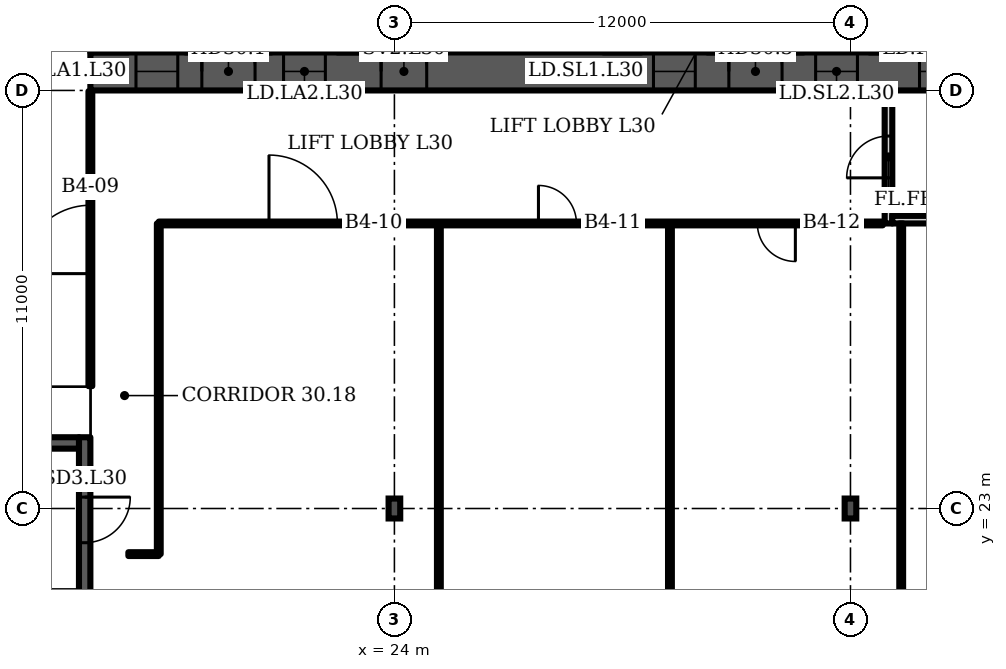
"""IFC4 building model, lengths in metres.
Left out: names, types, materials, properties, quantities, classifications, styles, units other than length and angle.
Written with IfcOpenShell. Run it as: python <this file> out.ifc"""

import sys

from ifc_helpers import new_model, si_unit, direction, frame, frame_2d, origin, origin_2d, place, context, subcontext, project, spatial, rectangle, i_section, extrude, element, fill, save


model = new_model("IFC4")
c1 = context("Model", 3, precision=1e-05, world=origin(), true_north=direction((0.0, 1.0)))
c2 = subcontext(c1, "Body", "Model", "MODEL_VIEW")
j1 = project(units=[si_unit("LENGTHUNIT", "METRE"), si_unit("PLANEANGLEUNIT", "RADIAN")], contexts=[c1])
p1 = place(None, origin())
s1 = spatial("IfcSite", under=j1, at=p1, CompositionType="ELEMENT")
p2 = place(p1, origin())
s2 = spatial("IfcBuilding", under=s1, at=p2, CompositionType="ELEMENT")
p3 = place(p2, frame((0.0, 0.0, 129.1)))
s3 = spatial("IfcBuildingStorey", under=s2, at=p3, CompositionType="ELEMENT", Elevation=129.1)
p4 = place(p3, frame((16.0, 34.5, 0.0), z_axis=(0.0, 0.0, 1.0), x_axis=(1.0, 0.0, 0.0)))
e1 = element("IfcWall", 1, at=p4, inside=s3, PredefinedType="SHEAR", context=c2, shape_type="SweptSolid", body=[
    extrude(rectangle(XDim=49.0, YDim=1.0, at=frame_2d((24.5, 0.0))), origin(), (0.0, 0.0, 1.0), 3.6),
])
p5 = place(p4, frame((1.2, 0.0, 0.0)))
e2 = element("IfcOpeningElement", 2, at=p5, cuts=e1, PredefinedType="OPENING", context=c2, shape_type="SweptSolid", body=[
    extrude(rectangle(XDim=1.1, YDim=2.1, at=frame_2d((0.55, 1.05))), frame((0.0, 0.51, 0.0), z_axis=(0.0, -1.0, 0.0), x_axis=(1.0, 0.0, 0.0)), (0.0, 0.0, 1.0), 1.02),
])
p6 = place(p4, frame((5.083, 0.0, 0.0)))
e3 = element("IfcOpeningElement", 3, at=p6, cuts=e1, PredefinedType="OPENING", context=c2, shape_type="SweptSolid", body=[
    extrude(rectangle(XDim=1.1, YDim=2.1, at=frame_2d((0.55, 1.05))), frame((0.0, 0.51, 0.0), z_axis=(0.0, -1.0, 0.0), x_axis=(1.0, 0.0, 0.0)), (0.0, 0.0, 1.0), 1.02),
])
p7 = place(p4, frame((2.933, 0.0, 0.0)))
e4 = element("IfcOpeningElement", 4, at=p7, cuts=e1, PredefinedType="OPENING", context=c2, shape_type="SweptSolid", body=[
    extrude(rectangle(XDim=1.4, YDim=2.1, at=frame_2d((0.7, 1.05))), frame((0.0, 0.51, 0.0), z_axis=(0.0, -1.0, 0.0), x_axis=(1.0, 0.0, 0.0)), (0.0, 0.0, 1.0), 1.02),
])
p8 = place(p4, frame((7.65, 0.0, 0.0)))
e5 = element("IfcOpeningElement", 5, at=p8, cuts=e1, PredefinedType="OPENING", context=c2, shape_type="SweptSolid", body=[
    extrude(rectangle(XDim=1.2, YDim=2.1, at=frame_2d((0.6, 1.05))), frame((0.0, 0.51, 0.0), z_axis=(0.0, -1.0, 0.0), x_axis=(1.0, 0.0, 0.0)), (0.0, 0.0, 1.0), 1.02),
])
p9 = place(p4, frame((14.817, 0.0, 0.0)))
e6 = element("IfcOpeningElement", 6, at=p9, cuts=e1, PredefinedType="OPENING", context=c2, shape_type="SweptSolid", body=[
    extrude(rectangle(XDim=1.1, YDim=2.1, at=frame_2d((0.55, 1.05))), frame((0.0, 0.51, 0.0), z_axis=(0.0, -1.0, 0.0), x_axis=(1.0, 0.0, 0.0)), (0.0, 0.0, 1.0), 1.02),
])
p10 = place(p4, frame((19.083, 0.0, 0.0)))
e7 = element("IfcOpeningElement", 7, at=p10, cuts=e1, PredefinedType="OPENING", context=c2, shape_type="SweptSolid", body=[
    extrude(rectangle(XDim=1.1, YDim=2.1, at=frame_2d((0.55, 1.05))), frame((0.0, 0.51, 0.0), z_axis=(0.0, -1.0, 0.0), x_axis=(1.0, 0.0, 0.0)), (0.0, 0.0, 1.0), 1.02),
])
p11 = place(p4, frame((16.8, 0.0, 0.0)))
e8 = element("IfcOpeningElement", 8, at=p11, cuts=e1, PredefinedType="OPENING", context=c2, shape_type="SweptSolid", body=[
    extrude(rectangle(XDim=1.4, YDim=2.1, at=frame_2d((0.7, 1.05))), frame((0.0, 0.51, 0.0), z_axis=(0.0, -1.0, 0.0), x_axis=(1.0, 0.0, 0.0)), (0.0, 0.0, 1.0), 1.02),
])
p12 = place(p4, frame((21.817, 0.0, 0.0)))
e9 = element("IfcOpeningElement", 9, at=p12, cuts=e1, PredefinedType="OPENING", context=c2, shape_type="SweptSolid", body=[
    extrude(rectangle(XDim=1.1, YDim=2.1, at=frame_2d((0.55, 1.05))), frame((0.0, 0.51, 0.0), z_axis=(0.0, -1.0, 0.0), x_axis=(1.0, 0.0, 0.0)), (0.0, 0.0, 1.0), 1.02),
])
p13 = place(p4, frame((26.083, 0.0, 0.0)))
e10 = element("IfcOpeningElement", 10, at=p13, cuts=e1, PredefinedType="OPENING", context=c2, shape_type="SweptSolid", body=[
    extrude(rectangle(XDim=1.1, YDim=2.1, at=frame_2d((0.55, 1.05))), frame((0.0, 0.51, 0.0), z_axis=(0.0, -1.0, 0.0), x_axis=(1.0, 0.0, 0.0)), (0.0, 0.0, 1.0), 1.02),
])
p14 = place(p4, frame((33.15, 0.0, 0.0)))
e11 = element("IfcOpeningElement", 11, at=p14, cuts=e1, PredefinedType="OPENING", context=c2, shape_type="SweptSolid", body=[
    extrude(rectangle(XDim=1.2, YDim=2.1, at=frame_2d((0.6, 1.05))), frame((0.0, 0.51, 0.0), z_axis=(0.0, -1.0, 0.0), x_axis=(1.0, 0.0, 0.0)), (0.0, 0.0, 1.0), 1.02),
])
p15 = place(p4, frame((37.8, 0.0, 0.0)))
e12 = element("IfcOpeningElement", 12, at=p15, cuts=e1, PredefinedType="OPENING", context=c2, shape_type="SweptSolid", body=[
    extrude(rectangle(XDim=1.4, YDim=2.1, at=frame_2d((0.7, 1.05))), frame((0.0, 0.51, 0.0), z_axis=(0.0, -1.0, 0.0), x_axis=(1.0, 0.0, 0.0)), (0.0, 0.0, 1.0), 1.02),
])
p16 = place(p4, frame((42.817, 0.0, 0.0)))
e13 = element("IfcOpeningElement", 13, at=p16, cuts=e1, PredefinedType="OPENING", context=c2, shape_type="SweptSolid", body=[
    extrude(rectangle(XDim=1.1, YDim=2.1, at=frame_2d((0.55, 1.05))), frame((0.0, 0.51, 0.0), z_axis=(0.0, -1.0, 0.0), x_axis=(1.0, 0.0, 0.0)), (0.0, 0.0, 1.0), 1.02),
])
p17 = place(p4, frame((46.7, 0.0, 0.0)))
e14 = element("IfcOpeningElement", 14, at=p17, cuts=e1, PredefinedType="OPENING", context=c2, shape_type="SweptSolid", body=[
    extrude(rectangle(XDim=1.1, YDim=2.1, at=frame_2d((0.55, 1.05))), frame((0.0, 0.51, 0.0), z_axis=(0.0, -1.0, 0.0), x_axis=(1.0, 0.0, 0.0)), (0.0, 0.0, 1.0), 1.02),
])
p18 = place(p4, frame((44.667, 0.0, 0.0)))
e15 = element("IfcOpeningElement", 15, at=p18, cuts=e1, PredefinedType="OPENING", context=c2, shape_type="SweptSolid", body=[
    extrude(rectangle(XDim=1.4, YDim=2.1, at=frame_2d((0.7, 1.05))), frame((0.0, 0.51, 0.0), z_axis=(0.0, -1.0, 0.0), x_axis=(1.0, 0.0, 0.0)), (0.0, 0.0, 1.0), 1.02),
])
for number, where, z_axis, x_axis in (
    (16, (24.0, 23.0, 0.0), (0.0, 0.0, 1.0), (1.0, 0.0, 0.0)),
    (17, (36.0, 23.0, 0.0), (0.0, 0.0, 1.0), (1.0, 0.0, 0.0)),
):
    element("IfcColumn", number, at=place(p3, frame(where, z_axis=z_axis, x_axis=x_axis)), inside=s3, PredefinedType="COLUMN", context=c2, shape_type="SweptSolid", body=[
        extrude(i_section(OverallWidth=0.306, OverallDepth=0.524, WebThickness=0.021, FlangeThickness=0.04, FilletRadius=0.027, at=origin_2d()), origin(), (0.0, 0.0, 1.0), 3.6),
    ])
p19 = place(p3, frame((37.0, 30.5, 0.0), z_axis=(0.0, 0.0, 1.0), x_axis=(0.0, 1.0, 0.0)))
e18 = element("IfcWall", 18, at=p19, inside=s3, PredefinedType="PARTITIONING", context=c2, shape_type="SweptSolid", body=[
    extrude(rectangle(XDim=3.5, YDim=0.2, at=frame_2d((1.75, 0.0))), origin(), (0.0, 0.0, 1.0), 3.2),
])
p20 = place(p19, frame((1.2, 0.0, 0.0)))
e19 = element("IfcOpeningElement", 19, at=p20, cuts=e18, PredefinedType="OPENING", context=c2, shape_type="SweptSolid", body=[
    extrude(rectangle(XDim=1.1, YDim=2.1, at=frame_2d((0.55, 1.05))), frame((0.0, 0.11, 0.0), z_axis=(0.0, -1.0, 0.0), x_axis=(1.0, 0.0, 0.0)), (0.0, 0.0, 1.0), 0.22),
])
p21 = place(p3, frame((37.1, 30.6, 0.0), z_axis=(0.0, 0.0, 1.0), x_axis=(1.0, 0.0, 0.0)))
e20 = element("IfcWall", 20, at=p21, inside=s3, PredefinedType="PARTITIONING", context=c2, shape_type="SweptSolid", body=[
    extrude(rectangle(XDim=2.8, YDim=0.2, at=frame_2d((1.4, 0.0))), origin(), (0.0, 0.0, 1.0), 3.2),
])
p22 = place(p3, frame((15.85, 20.525, 0.0), z_axis=(0.0, 0.0, 1.0), x_axis=(0.0, 1.0, 0.0)))
e21 = element("IfcWall", 21, at=p22, inside=s3, PredefinedType="SHEAR", context=c2, shape_type="SweptSolid", body=[
    extrude(rectangle(XDim=4.35, YDim=0.3, at=frame_2d((2.175, 0.0))), origin(), (0.0, 0.0, 1.0), 3.2),
])
p23 = place(p22, frame((1.575, 0.0, 0.0)))
e22 = element("IfcOpeningElement", 22, at=p23, cuts=e21, PredefinedType="OPENING", context=c2, shape_type="SweptSolid", body=[
    extrude(rectangle(XDim=1.2, YDim=2.1, at=frame_2d((0.6, 1.05))), frame((0.0, 0.16, 0.0), z_axis=(0.0, -1.0, 0.0), x_axis=(1.0, 0.0, 0.0)), (0.0, 0.0, 1.0), 0.32),
])
p24 = place(p3, frame((16.0, 26.22, 0.0), z_axis=(0.0, 0.0, 1.0), x_axis=(0.0, 1.0, 0.0)))
e23 = element("IfcWall", 23, at=p24, inside=s3, PredefinedType="PARTITIONING", context=c2, shape_type="SweptSolid", body=[
    extrude(rectangle(XDim=7.76, YDim=0.1, at=frame_2d((3.88, 0.0))), origin(), (0.0, 0.0, 1.0), 3.2),
])
p25 = place(p24, frame((2.96, 0.0, 0.0)))
e24 = element("IfcOpeningElement", 24, at=p25, cuts=e23, PredefinedType="OPENING", context=c2, shape_type="SweptSolid", body=[
    extrude(rectangle(XDim=1.8, YDim=2.1, at=frame_2d((0.9, 1.05))), frame((0.0, 0.06, 0.0), z_axis=(0.0, -1.0, 0.0), x_axis=(1.0, 0.0, 0.0)), (0.0, 0.0, 1.0), 0.12),
])
p26 = place(p3, frame((17.0, 21.8, 0.0), z_axis=(0.0, 0.0, 1.0), x_axis=(1.0, 0.0, 0.0)))
e25 = element("IfcWall", 25, at=p26, inside=s3, PredefinedType="PARTITIONING", context=c2, shape_type="SweptSolid", body=[
    extrude(rectangle(XDim=0.8, YDim=0.1, at=frame_2d((0.4, 0.0))), origin(), (0.0, 0.0, 1.0), 3.2),
])
p27 = place(p3, frame((17.8, 21.8, 0.0), z_axis=(0.0, 0.0, 1.0), x_axis=(0.0, 1.0, 0.0)))
e26 = element("IfcWall", 26, at=p27, inside=s3, PredefinedType="PARTITIONING", context=c2, shape_type="SweptSolid", body=[
    extrude(rectangle(XDim=8.7, YDim=0.1, at=frame_2d((4.35, 0.0))), origin(), (0.0, 0.0, 1.0), 3.2),
])
p28 = place(p3, frame((17.8, 30.5, 0.0), z_axis=(0.0, 0.0, 1.0), x_axis=(1.0, 0.0, 0.0)))
e27 = element("IfcWall", 27, at=p28, inside=s3, PredefinedType="PARTITIONING", context=c2, shape_type="SweptSolid", body=[
    extrude(rectangle(XDim=19.05, YDim=0.1, at=frame_2d((9.525, 0.0))), origin(), (0.0, 0.0, 1.0), 3.2),
])
p29 = place(p28, frame((2.9, 0.0, 0.0)))
e28 = element("IfcOpeningElement", 28, at=p29, cuts=e27, PredefinedType="OPENING", context=c2, shape_type="SweptSolid", body=[
    extrude(rectangle(XDim=1.8, YDim=2.1, at=frame_2d((0.9, 1.05))), frame((0.0, 0.06, 0.0), z_axis=(0.0, -1.0, 0.0), x_axis=(1.0, 0.0, 0.0)), (0.0, 0.0, 1.0), 0.12),
])
p30 = place(p28, frame((9.99, 0.0, 0.0)))
e29 = element("IfcOpeningElement", 29, at=p30, cuts=e27, PredefinedType="OPENING", context=c2, shape_type="SweptSolid", body=[
    extrude(rectangle(XDim=1.0, YDim=2.1, at=frame_2d((0.5, 1.05))), frame((0.0, 0.06, 0.0), z_axis=(0.0, -1.0, 0.0), x_axis=(1.0, 0.0, 0.0)), (0.0, 0.0, 1.0), 0.12),
])
p31 = place(p28, frame((15.75, 0.0, 0.0)))
e30 = element("IfcOpeningElement", 30, at=p31, cuts=e27, PredefinedType="OPENING", context=c2, shape_type="SweptSolid", body=[
    extrude(rectangle(XDim=1.0, YDim=2.1, at=frame_2d((0.5, 1.05))), frame((0.0, 0.06, 0.0), z_axis=(0.0, -1.0, 0.0), x_axis=(1.0, 0.0, 0.0)), (0.0, 0.0, 1.0), 0.12),
])
p32 = place(p3, frame((25.17, 1.12, 0.0), z_axis=(0.0, 0.0, 1.0), x_axis=(0.0, 1.0, 0.0)))
e31 = element("IfcWall", 31, at=p32, inside=s3, PredefinedType="PARTITIONING", context=c2, shape_type="SweptSolid", body=[
    extrude(rectangle(XDim=29.38, YDim=0.1, at=frame_2d((14.69, 0.0))), origin(), (0.0, 0.0, 1.0), 3.2),
])
p33 = place(p3, frame((31.25, 0.59, 0.0), z_axis=(0.0, 0.0, 1.0), x_axis=(0.0, 1.0, 0.0)))
e32 = element("IfcWall", 32, at=p33, inside=s3, PredefinedType="PARTITIONING", context=c2, shape_type="SweptSolid", body=[
    extrude(rectangle(XDim=29.91, YDim=0.1, at=frame_2d((14.955, 0.0))), origin(), (0.0, 0.0, 1.0), 3.2),
])
p34 = place(p3, frame((37.335, 0.055, 0.0), z_axis=(0.0, 0.0, 1.0), x_axis=(0.0, 1.0, 0.0)))
e33 = element("IfcWall", 33, at=p34, inside=s3, PredefinedType="PARTITIONING", context=c2, shape_type="SweptSolid", body=[
    extrude(rectangle(XDim=30.445, YDim=0.1, at=frame_2d((15.223, 0.0))), origin(), (0.0, 0.0, 1.0), 3.2),
])
p35 = place(p3, frame((8.2, 24.725, 0.0), z_axis=(0.0, 0.0, 1.0), x_axis=(1.0, 0.0, 0.0)))
e34 = element("IfcWall", 34, at=p35, inside=s3, PredefinedType="SHEAR", context=c2, shape_type="SweptSolid", body=[
    extrude(rectangle(XDim=7.5, YDim=0.3, at=frame_2d((3.75, 0.0))), origin(), (0.0, 0.0, 1.0), 3.2),
])
p36 = place(p5, origin())
e35 = element("IfcDoor", 35, at=p36, inside=s3, OperationType="DOUBLE_DOOR_SLIDING", PredefinedType="DOOR", context=c2, shape_type="SweptSolid", body=[
    extrude(rectangle(XDim=1.1, YDim=2.1, at=frame_2d((0.55, 1.05))), frame((0.0, 0.025, 0.0), z_axis=(0.0, -1.0, 0.0), x_axis=(1.0, 0.0, 0.0)), (0.0, 0.0, 1.0), 0.05),
])
fill(e2, e35)
p37 = place(p6, origin())
e36 = element("IfcDoor", 36, at=p37, inside=s3, OperationType="DOUBLE_DOOR_SLIDING", PredefinedType="DOOR", context=c2, shape_type="SweptSolid", body=[
    extrude(rectangle(XDim=1.1, YDim=2.1, at=frame_2d((0.55, 1.05))), frame((0.0, 0.025, 0.0), z_axis=(0.0, -1.0, 0.0), x_axis=(1.0, 0.0, 0.0)), (0.0, 0.0, 1.0), 0.05),
])
fill(e3, e36)
p38 = place(p7, origin())
e37 = element("IfcDoor", 37, at=p38, inside=s3, OperationType="DOUBLE_DOOR_SINGLE_SWING", PredefinedType="DOOR", context=c2, shape_type="SweptSolid", body=[
    extrude(rectangle(XDim=1.4, YDim=2.1, at=frame_2d((0.7, 1.05))), frame((0.0, 0.025, 0.0), z_axis=(0.0, -1.0, 0.0), x_axis=(1.0, 0.0, 0.0)), (0.0, 0.0, 1.0), 0.05),
])
fill(e4, e37)
p39 = place(p8, origin())
e38 = element("IfcDoor", 38, at=p39, inside=s3, OperationType="SINGLE_SWING_LEFT", PredefinedType="DOOR", context=c2, shape_type="SweptSolid", body=[
    extrude(rectangle(XDim=1.2, YDim=2.1, at=frame_2d((0.6, 1.05))), frame((0.0, 0.025, 0.0), z_axis=(0.0, -1.0, 0.0), x_axis=(1.0, 0.0, 0.0)), (0.0, 0.0, 1.0), 0.05),
])
fill(e5, e38)
p40 = place(p9, origin())
e39 = element("IfcDoor", 39, at=p40, inside=s3, OperationType="DOUBLE_DOOR_SLIDING", PredefinedType="DOOR", context=c2, shape_type="SweptSolid", body=[
    extrude(rectangle(XDim=1.1, YDim=2.1, at=frame_2d((0.55, 1.05))), frame((0.0, 0.025, 0.0), z_axis=(0.0, -1.0, 0.0), x_axis=(1.0, 0.0, 0.0)), (0.0, 0.0, 1.0), 0.05),
])
fill(e6, e39)
p41 = place(p10, origin())
e40 = element("IfcDoor", 40, at=p41, inside=s3, OperationType="DOUBLE_DOOR_SLIDING", PredefinedType="DOOR", context=c2, shape_type="SweptSolid", body=[
    extrude(rectangle(XDim=1.1, YDim=2.1, at=frame_2d((0.55, 1.05))), frame((0.0, 0.025, 0.0), z_axis=(0.0, -1.0, 0.0), x_axis=(1.0, 0.0, 0.0)), (0.0, 0.0, 1.0), 0.05),
])
fill(e7, e40)
p42 = place(p11, origin())
e41 = element("IfcDoor", 41, at=p42, inside=s3, OperationType="DOUBLE_DOOR_SINGLE_SWING", PredefinedType="DOOR", context=c2, shape_type="SweptSolid", body=[
    extrude(rectangle(XDim=1.4, YDim=2.1, at=frame_2d((0.7, 1.05))), frame((0.0, 0.025, 0.0), z_axis=(0.0, -1.0, 0.0), x_axis=(1.0, 0.0, 0.0)), (0.0, 0.0, 1.0), 0.05),
])
fill(e8, e41)
p43 = place(p12, origin())
e42 = element("IfcDoor", 42, at=p43, inside=s3, OperationType="DOUBLE_DOOR_SLIDING", PredefinedType="DOOR", context=c2, shape_type="SweptSolid", body=[
    extrude(rectangle(XDim=1.1, YDim=2.1, at=frame_2d((0.55, 1.05))), frame((0.0, 0.025, 0.0), z_axis=(0.0, -1.0, 0.0), x_axis=(1.0, 0.0, 0.0)), (0.0, 0.0, 1.0), 0.05),
])
fill(e9, e42)
p44 = place(p20, origin())
e43 = element("IfcDoor", 43, at=p44, inside=s3, OperationType="SINGLE_SWING_LEFT", PredefinedType="DOOR", context=c2, shape_type="SweptSolid", body=[
    extrude(rectangle(XDim=1.1, YDim=2.1, at=frame_2d((0.55, 1.05))), frame((0.0, 0.025, 0.0), z_axis=(0.0, -1.0, 0.0), x_axis=(1.0, 0.0, 0.0)), (0.0, 0.0, 1.0), 0.05),
])
fill(e19, e43)
p45 = place(p23, origin())
e44 = element("IfcDoor", 44, at=p45, inside=s3, OperationType="SINGLE_SWING_RIGHT", PredefinedType="DOOR", context=c2, shape_type="SweptSolid", body=[
    extrude(rectangle(XDim=1.2, YDim=2.1, at=frame_2d((0.6, 1.05))), frame((0.0, 0.025, 0.0), z_axis=(0.0, -1.0, 0.0), x_axis=(1.0, 0.0, 0.0)), (0.0, 0.0, 1.0), 0.05),
])
fill(e22, e44)
p46 = place(p25, origin())
e45 = element("IfcDoor", 45, at=p46, inside=s3, OperationType="DOUBLE_DOOR_SINGLE_SWING", PredefinedType="DOOR", context=c2, shape_type="SweptSolid", body=[
    extrude(rectangle(XDim=1.8, YDim=2.1, at=frame_2d((0.9, 1.05))), frame((0.0, 0.025, 0.0), z_axis=(0.0, -1.0, 0.0), x_axis=(1.0, 0.0, 0.0)), (0.0, 0.0, 1.0), 0.05),
])
fill(e24, e45)
p47 = place(p29, origin())
e46 = element("IfcDoor", 46, at=p47, inside=s3, OperationType="DOUBLE_DOOR_SINGLE_SWING", PredefinedType="DOOR", context=c2, shape_type="SweptSolid", body=[
    extrude(rectangle(XDim=1.8, YDim=2.1, at=frame_2d((0.9, 1.05))), frame((0.0, 0.025, 0.0), z_axis=(0.0, -1.0, 0.0), x_axis=(1.0, 0.0, 0.0)), (0.0, 0.0, 1.0), 0.05),
])
fill(e28, e46)
p48 = place(p30, origin())
e47 = element("IfcDoor", 47, at=p48, inside=s3, OperationType="SINGLE_SWING_LEFT", PredefinedType="DOOR", context=c2, shape_type="SweptSolid", body=[
    extrude(rectangle(XDim=1.0, YDim=2.1, at=frame_2d((0.5, 1.05))), frame((0.0, 0.025, 0.0), z_axis=(0.0, -1.0, 0.0), x_axis=(1.0, 0.0, 0.0)), (0.0, 0.0, 1.0), 0.05),
])
fill(e29, e47)
p49 = place(p31, origin())
e48 = element("IfcDoor", 48, at=p49, inside=s3, OperationType="SINGLE_SWING_RIGHT", PredefinedType="DOOR", context=c2, shape_type="SweptSolid", body=[
    extrude(rectangle(XDim=1.0, YDim=2.1, at=frame_2d((0.5, 1.05))), frame((0.0, 0.025, 0.0), z_axis=(0.0, -1.0, 0.0), x_axis=(1.0, 0.0, 0.0)), (0.0, 0.0, 1.0), 0.05),
])
fill(e30, e48)
save(model, sys.argv[1])
